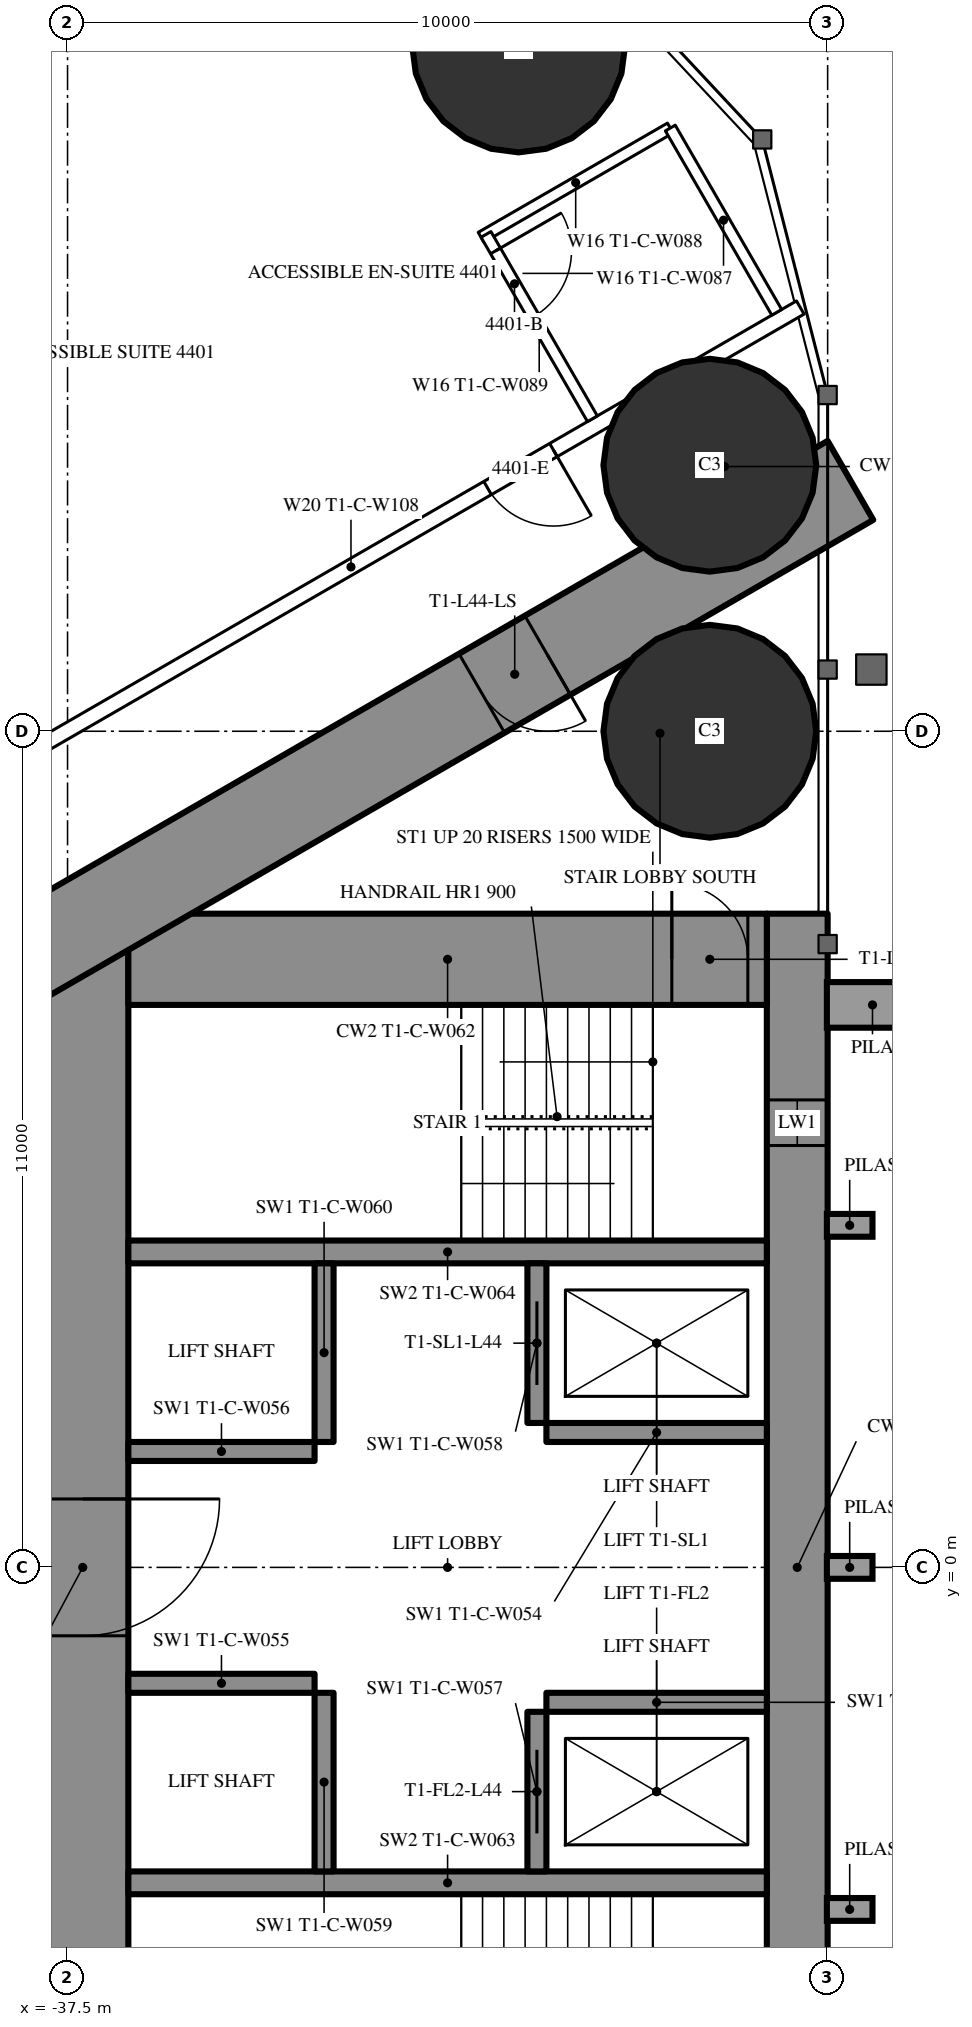
"""IFC4 building model, lengths in metres.
Left out: names, types, materials, properties, quantities, classifications, styles, units other than length and angle.
Written with IfcOpenShell. Run it as: python <this file> out.ifc"""

import sys

from ifc_helpers import new_model, si_unit, direction, frame, frame_2d, origin, origin_2d, place, context, subcontext, project, spatial, rectangle, circle, extrude, element, fill, save


model = new_model("IFC4")
c1 = context("Model", 3, precision=1e-05, world=origin(), true_north=direction((0.0, 1.0)))
c2 = subcontext(c1, "Body", "Model", "MODEL_VIEW")
j1 = project(units=[si_unit("LENGTHUNIT", "METRE"), si_unit("PLANEANGLEUNIT", "RADIAN")], contexts=[c1])
p1 = place(None, origin())
s1 = spatial("IfcSite", under=j1, at=p1, CompositionType="ELEMENT")
p2 = place(p1, origin())
s2 = spatial("IfcBuilding", under=s1, at=p2, CompositionType="ELEMENT")
p3 = place(p2, frame((0.0, 0.0, 166.8)))
s3 = spatial("IfcBuildingStorey", under=s2, at=p3, CompositionType="ELEMENT", Elevation=166.8)
for number, where, z_axis, x_axis in (
    (1, (-31.565, 20.016, 0.0), (0.0, 0.0, 1.0), (1.0, 0.0, 0.0)),
    (2, (-29.05, 11.0, 0.0), (0.0, 0.0, 1.0), (1.0, 0.0, 0.0)),
    (3, (-29.05, 14.5, 0.0), (0.0, 0.0, 1.0), (1.0, 0.0, 0.0)),
):
    element("IfcColumn", number, at=place(p3, frame(where, z_axis=z_axis, x_axis=x_axis)), inside=s3, PredefinedType="COLUMN", context=c2, shape_type="SweptSolid", body=[
        extrude(circle(Radius=1.4, at=origin_2d()), origin(), (0.0, 0.0, 1.0), 3.5),
    ])
p4 = place(p3, frame((-27.9, 8.6, 0.0), z_axis=(0.0, 0.0, 1.0), x_axis=(0.0, -1.0, 0.0)))
e4 = element("IfcWall", 4, at=p4, inside=s3, PredefinedType="SHEAR", context=c2, shape_type="SweptSolid", body=[
    extrude(rectangle(XDim=17.2, YDim=0.8, at=frame_2d((8.6, 0.0))), origin(), (0.0, 0.0, 1.0), 3.5),
])
p5 = place(p4, frame((2.45, 0.0, 0.6)))
e5 = element("IfcOpeningElement", 5, at=p5, cuts=e4, PredefinedType="OPENING", context=c2, shape_type="SweptSolid", body=[
    extrude(rectangle(XDim=0.6, YDim=2.1, at=frame_2d((0.3, 1.05))), frame((0.0, 0.41, 0.0), z_axis=(0.0, -1.0, 0.0), x_axis=(1.0, 0.0, 0.0)), (0.0, 0.0, 1.0), 0.82),
])
p6 = place(p4, frame((14.15, 0.0, 0.6)))
e6 = element("IfcOpeningElement", 6, at=p6, cuts=e4, PredefinedType="OPENING", context=c2, shape_type="SweptSolid", body=[
    extrude(rectangle(XDim=0.6, YDim=2.1, at=frame_2d((0.3, 1.05))), frame((0.0, 0.41, 0.0), z_axis=(0.0, -1.0, 0.0), x_axis=(1.0, 0.0, 0.0)), (0.0, 0.0, 1.0), 0.82),
])
p7 = place(p3, frame((-37.3, 8.6, 0.0), z_axis=(0.0, 0.0, 1.0), x_axis=(0.0, -1.0, 0.0)))
e7 = element("IfcWall", 7, at=p7, inside=s3, PredefinedType="SHEAR", context=c2, shape_type="SweptSolid", body=[
    extrude(rectangle(XDim=17.2, YDim=1.2, at=frame_2d((8.6, 0.0))), origin(), (0.0, 0.0, 1.0), 3.5),
])
p8 = place(p7, frame((7.7, 0.0, 0.0)))
e8 = element("IfcOpeningElement", 8, at=p8, cuts=e7, PredefinedType="OPENING", context=c2, shape_type="SweptSolid", body=[
    extrude(rectangle(XDim=1.8, YDim=2.2, at=frame_2d((0.9, 1.1))), frame((0.0, 0.61, 0.0), z_axis=(0.0, -1.0, 0.0), x_axis=(1.0, 0.0, 0.0)), (0.0, 0.0, 1.0), 1.22),
])
p9 = place(p3, frame((-28.3, 8.0, 0.0), z_axis=(0.0, 0.0, 1.0), x_axis=(-1.0, 0.0, 0.0)))
e9 = element("IfcWall", 9, at=p9, inside=s3, PredefinedType="SHEAR", context=c2, shape_type="SweptSolid", body=[
    extrude(rectangle(XDim=8.4, YDim=1.2, at=frame_2d((4.2, 0.0))), origin(), (0.0, 0.0, 1.0), 3.5),
])
p10 = place(p9, frame((0.25, 0.0, 0.0)))
e10 = element("IfcOpeningElement", 10, at=p10, cuts=e9, PredefinedType="OPENING", context=c2, shape_type="SweptSolid", body=[
    extrude(rectangle(XDim=1.0, YDim=2.2, at=frame_2d((0.5, 1.1))), frame((0.0, 0.61, 0.0), z_axis=(0.0, -1.0, 0.0), x_axis=(1.0, 0.0, 0.0)), (0.0, 0.0, 1.0), 1.22),
])
for number, where, z_axis, x_axis in (
    (11, (-28.3, 4.15, 0.0), (0.0, 0.0, 1.0), (-1.0, 0.0, 0.0)),
    (12, (-28.3, -4.15, 0.0), (0.0, 0.0, 1.0), (-1.0, 0.0, 0.0)),
):
    element("IfcWall", number, at=place(p3, frame(where, z_axis=z_axis, x_axis=x_axis)), inside=s3, PredefinedType="SHEAR", context=c2, shape_type="SweptSolid", body=[
        extrude(rectangle(XDim=8.4, YDim=0.3, at=frame_2d((4.2, 0.0))), origin(), (0.0, 0.0, 1.0), 3.5),
    ])
p11 = place(p3, frame((-31.325, 4.0, 0.0), z_axis=(0.0, 0.0, 1.0), x_axis=(0.0, -1.0, 0.0)))
e13 = element("IfcWall", 13, at=p11, inside=s3, PredefinedType="SHEAR", context=c2, shape_type="SweptSolid", body=[
    extrude(rectangle(XDim=2.1, YDim=0.25, at=frame_2d((1.05, 0.0))), origin(), (0.0, 0.0, 1.0), 3.5),
])
p12 = place(p11, frame((0.5, 0.0, 0.0)))
e14 = element("IfcOpeningElement", 14, at=p12, cuts=e13, PredefinedType="OPENING", context=c2, shape_type="SweptSolid", body=[
    extrude(rectangle(XDim=1.1, YDim=2.2, at=frame_2d((0.55, 1.1))), frame((0.0, 0.135, 0.0), z_axis=(0.0, -1.0, 0.0), x_axis=(1.0, 0.0, 0.0)), (0.0, 0.0, 1.0), 0.27),
])
p13 = place(p3, frame((-34.125, 4.0, 0.0), z_axis=(0.0, 0.0, 1.0), x_axis=(0.0, -1.0, 0.0)))
e15 = element("IfcWall", 15, at=p13, inside=s3, PredefinedType="SHEAR", context=c2, shape_type="SweptSolid", body=[
    extrude(rectangle(XDim=2.35, YDim=0.25, at=frame_2d((1.175, 0.0))), origin(), (0.0, 0.0, 1.0), 3.5),
])
p14 = place(p3, frame((-28.3, 1.775, 0.0), z_axis=(0.0, 0.0, 1.0), x_axis=(-1.0, 0.0, 0.0)))
e16 = element("IfcWall", 16, at=p14, inside=s3, PredefinedType="SHEAR", context=c2, shape_type="SweptSolid", body=[
    extrude(rectangle(XDim=2.9, YDim=0.25, at=frame_2d((1.45, 0.0))), origin(), (0.0, 0.0, 1.0), 3.5),
])
p15 = place(p3, frame((-34.25, 1.525, 0.0), z_axis=(0.0, 0.0, 1.0), x_axis=(-1.0, 0.0, 0.0)))
e17 = element("IfcWall", 17, at=p15, inside=s3, PredefinedType="SHEAR", context=c2, shape_type="SweptSolid", body=[
    extrude(rectangle(XDim=2.45, YDim=0.25, at=frame_2d((1.225, 0.0))), origin(), (0.0, 0.0, 1.0), 3.5),
])
p16 = place(p3, frame((-31.325, -1.9, 0.0), z_axis=(0.0, 0.0, 1.0), x_axis=(0.0, -1.0, 0.0)))
e18 = element("IfcWall", 18, at=p16, inside=s3, PredefinedType="SHEAR", context=c2, shape_type="SweptSolid", body=[
    extrude(rectangle(XDim=2.1, YDim=0.25, at=frame_2d((1.05, 0.0))), origin(), (0.0, 0.0, 1.0), 3.5),
])
p17 = place(p16, frame((0.5, 0.0, 0.0)))
e19 = element("IfcOpeningElement", 19, at=p17, cuts=e18, PredefinedType="OPENING", context=c2, shape_type="SweptSolid", body=[
    extrude(rectangle(XDim=1.1, YDim=2.2, at=frame_2d((0.55, 1.1))), frame((0.0, 0.135, 0.0), z_axis=(0.0, -1.0, 0.0), x_axis=(1.0, 0.0, 0.0)), (0.0, 0.0, 1.0), 0.27),
])
p18 = place(p3, frame((-34.125, -1.65, 0.0), z_axis=(0.0, 0.0, 1.0), x_axis=(0.0, -1.0, 0.0)))
e20 = element("IfcWall", 20, at=p18, inside=s3, PredefinedType="SHEAR", context=c2, shape_type="SweptSolid", body=[
    extrude(rectangle(XDim=2.35, YDim=0.25, at=frame_2d((1.175, 0.0))), origin(), (0.0, 0.0, 1.0), 3.5),
])
p19 = place(p3, frame((-28.3, -1.775, 0.0), z_axis=(0.0, 0.0, 1.0), x_axis=(-1.0, 0.0, 0.0)))
e21 = element("IfcWall", 21, at=p19, inside=s3, PredefinedType="SHEAR", context=c2, shape_type="SweptSolid", body=[
    extrude(rectangle(XDim=2.9, YDim=0.25, at=frame_2d((1.45, 0.0))), origin(), (0.0, 0.0, 1.0), 3.5),
])
p20 = place(p3, frame((-34.25, -1.525, 0.0), z_axis=(0.0, 0.0, 1.0), x_axis=(-1.0, 0.0, 0.0)))
e22 = element("IfcWall", 22, at=p20, inside=s3, PredefinedType="SHEAR", context=c2, shape_type="SweptSolid", body=[
    extrude(rectangle(XDim=2.45, YDim=0.25, at=frame_2d((1.225, 0.0))), origin(), (0.0, 0.0, 1.0), 3.5),
])
p21 = place(p3, frame((-27.2, 14.3, 0.0), z_axis=(0.0, 0.0, 1.0), x_axis=(-0.866026593062, -0.499997940104, 0.0)))
e23 = element("IfcWall", 23, at=p21, inside=s3, PredefinedType="SHEAR", context=c2, shape_type="SweptSolid", body=[
    extrude(rectangle(XDim=28.946, YDim=1.2, at=frame_2d((14.473, 0.0))), origin(), (0.0, 0.0, 1.0), 3.5),
])
p22 = place(p21, frame((4.6, 0.0, 0.0)))
e24 = element("IfcOpeningElement", 24, at=p22, cuts=e23, PredefinedType="OPENING", context=c2, shape_type="SweptSolid", body=[
    extrude(rectangle(XDim=1.0, YDim=2.2, at=frame_2d((0.5, 1.1))), frame((0.0, 0.61, 0.0), z_axis=(0.0, -1.0, 0.0), x_axis=(1.0, 0.0, 0.0)), (0.0, 0.0, 1.0), 1.22),
])
p23 = place(p21, frame((13.395, 0.0, 0.0)))
e25 = element("IfcOpeningElement", 25, at=p23, cuts=e23, PredefinedType="OPENING", context=c2, shape_type="SweptSolid", body=[
    extrude(rectangle(XDim=1.8, YDim=2.2, at=frame_2d((0.9, 1.1))), frame((0.0, 0.61, 0.0), z_axis=(0.0, -1.0, 0.0), x_axis=(1.0, 0.0, 0.0)), (0.0, 0.0, 1.0), 1.22),
])
p24 = place(p3, frame((-27.2, -14.3, 0.0), z_axis=(0.0, 0.0, 1.0), x_axis=(-0.866024021859, 0.500002393557, 0.0)))
e26 = element("IfcWall", 26, at=p24, inside=s3, PredefinedType="SHEAR", context=c2, shape_type="SweptSolid", body=[
    extrude(rectangle(XDim=27.907, YDim=1.2, at=frame_2d((13.954, 0.0))), origin(), (0.0, 0.0, 1.0), 3.5),
])
p25 = place(p24, frame((4.6, 0.0, 0.0)))
e27 = element("IfcOpeningElement", 27, at=p25, cuts=e26, PredefinedType="OPENING", context=c2, shape_type="SweptSolid", body=[
    extrude(rectangle(XDim=1.0, YDim=2.2, at=frame_2d((0.5, 1.1))), frame((0.0, 0.61, 0.0), z_axis=(0.0, -1.0, 0.0), x_axis=(1.0, 0.0, 0.0)), (0.0, 0.0, 1.0), 1.22),
])
p26 = place(p24, frame((13.395, 0.0, 0.0)))
e28 = element("IfcOpeningElement", 28, at=p26, cuts=e26, PredefinedType="OPENING", context=c2, shape_type="SweptSolid", body=[
    extrude(rectangle(XDim=1.8, YDim=2.2, at=frame_2d((0.9, 1.1))), frame((0.0, 0.61, 0.0), z_axis=(0.0, -1.0, 0.0), x_axis=(1.0, 0.0, 0.0)), (0.0, 0.0, 1.0), 1.22),
])
p27 = place(p3, frame((-27.86, 16.575, 0.0), z_axis=(0.0, 0.0, 1.0), x_axis=(-0.866026850238, -0.499997494661, 0.0)))
e29 = element("IfcWall", 29, at=p27, inside=s3, PredefinedType="PARTITIONING", context=c2, shape_type="SweptSolid", body=[
    extrude(rectangle(XDim=13.651, YDim=0.2, at=frame_2d((6.826, 0.0))), origin(), (0.0, 0.0, 1.0), 3.25),
])
p28 = place(p27, frame((3.75, 0.0, 0.0)))
e30 = element("IfcOpeningElement", 30, at=p28, cuts=e29, PredefinedType="OPENING", context=c2, shape_type="SweptSolid", body=[
    extrude(rectangle(XDim=1.0, YDim=2.2, at=frame_2d((0.5, 1.1))), frame((0.0, 0.11, 0.0), z_axis=(0.0, -1.0, 0.0), x_axis=(1.0, 0.0, 0.0)), (0.0, 0.0, 1.0), 0.22),
])
p29 = place(p3, frame((-29.57, 18.936, 0.0), z_axis=(0.0, 0.0, 1.0), x_axis=(-0.866018712932, -0.500011588718, 0.0)))
e31 = element("IfcWall", 31, at=p29, inside=s3, PredefinedType="PARTITIONING", context=c2, shape_type="SweptSolid", body=[
    extrude(rectangle(XDim=2.875, YDim=0.15, at=frame_2d((1.438, 0.0))), origin(), (0.0, 0.0, 1.0), 3.25),
])
p30 = place(p3, frame((-30.595, 15.111, 0.0), z_axis=(0.0, 0.0, 1.0), x_axis=(-0.49998411664, 0.866034573852, 0.0)))
e32 = element("IfcWall", 32, at=p30, inside=s3, PredefinedType="PARTITIONING", context=c2, shape_type="SweptSolid", body=[
    extrude(rectangle(XDim=2.8, YDim=0.15, at=frame_2d((1.4, 0.0))), origin(), (0.0, 0.0, 1.0), 3.25),
])
p31 = place(p30, frame((1.55, 0.0, 0.0)))
e33 = element("IfcOpeningElement", 33, at=p31, cuts=e32, PredefinedType="OPENING", context=c2, shape_type="SweptSolid", body=[
    extrude(rectangle(XDim=1.0, YDim=2.2, at=frame_2d((0.5, 1.1))), frame((0.0, 0.085, 0.0), z_axis=(0.0, -1.0, 0.0), x_axis=(1.0, 0.0, 0.0)), (0.0, 0.0, 1.0), 0.17),
])
p32 = place(p3, frame((-28.17, 16.511, 0.0), z_axis=(0.0, 0.0, 1.0), x_axis=(-0.49994636267, 0.866056369097, 0.0)))
e34 = element("IfcWall", 34, at=p32, inside=s3, PredefinedType="PARTITIONING", context=c2, shape_type="SweptSolid", body=[
    extrude(rectangle(XDim=2.8, YDim=0.15, at=frame_2d((1.4, 0.0))), origin(), (0.0, 0.0, 1.0), 3.25),
])
p33 = place(p31, origin())
e35 = element("IfcDoor", 35, at=p33, inside=s3, OperationType="SINGLE_SWING_RIGHT", PredefinedType="DOOR", context=c2, shape_type="SweptSolid", body=[
    extrude(rectangle(XDim=1.0, YDim=2.2, at=frame_2d((0.5, 1.1))), frame((0.0, 0.025, 0.0), z_axis=(0.0, -1.0, 0.0), x_axis=(1.0, 0.0, 0.0)), (0.0, 0.0, 1.0), 0.05),
])
fill(e33, e35)
p34 = place(p28, origin())
e36 = element("IfcDoor", 36, at=p34, inside=s3, OperationType="SINGLE_SWING_LEFT", PredefinedType="DOOR", context=c2, shape_type="SweptSolid", body=[
    extrude(rectangle(XDim=1.0, YDim=2.2, at=frame_2d((0.5, 1.1))), frame((0.0, 0.025, 0.0), z_axis=(0.0, -1.0, 0.0), x_axis=(1.0, 0.0, 0.0)), (0.0, 0.0, 1.0), 0.05),
])
fill(e30, e36)
p35 = place(p22, origin())
e37 = element("IfcDoor", 37, at=p35, inside=s3, OperationType="SINGLE_SWING_LEFT", PredefinedType="DOOR", context=c2, shape_type="SweptSolid", body=[
    extrude(rectangle(XDim=1.0, YDim=2.2, at=frame_2d((0.5, 1.1))), frame((0.0, 0.025, 0.0), z_axis=(0.0, -1.0, 0.0), x_axis=(1.0, 0.0, 0.0)), (0.0, 0.0, 1.0), 0.05),
])
fill(e24, e37)
p36 = place(p8, origin())
e38 = element("IfcDoor", 38, at=p36, inside=s3, OperationType="DOUBLE_DOOR_SINGLE_SWING", PredefinedType="DOOR", context=c2, shape_type="SweptSolid", body=[
    extrude(rectangle(XDim=1.8, YDim=2.2, at=frame_2d((0.9, 1.1))), frame((0.0, 0.025, 0.0), z_axis=(0.0, -1.0, 0.0), x_axis=(1.0, 0.0, 0.0)), (0.0, 0.0, 1.0), 0.05),
])
fill(e8, e38)
p37 = place(p10, origin())
e39 = element("IfcDoor", 39, at=p37, inside=s3, OperationType="SINGLE_SWING_RIGHT", PredefinedType="DOOR", context=c2, shape_type="SweptSolid", body=[
    extrude(rectangle(XDim=1.0, YDim=2.2, at=frame_2d((0.5, 1.1))), frame((0.0, 0.025, 0.0), z_axis=(0.0, -1.0, 0.0), x_axis=(1.0, 0.0, 0.0)), (0.0, 0.0, 1.0), 0.05),
])
fill(e10, e39)
p38 = place(p12, origin())
e40 = element("IfcDoor", 40, at=p38, inside=s3, OperationType="SLIDING_TO_LEFT", PredefinedType="USERDEFINED", context=c2, shape_type="SweptSolid", body=[
    extrude(rectangle(XDim=1.1, YDim=2.2, at=frame_2d((0.55, 1.1))), frame((0.0, 0.025, 0.0), z_axis=(0.0, -1.0, 0.0), x_axis=(1.0, 0.0, 0.0)), (0.0, 0.0, 1.0), 0.05),
])
fill(e14, e40)
p39 = place(p17, origin())
e41 = element("IfcDoor", 41, at=p39, inside=s3, OperationType="SLIDING_TO_LEFT", PredefinedType="USERDEFINED", context=c2, shape_type="SweptSolid", body=[
    extrude(rectangle(XDim=1.1, YDim=2.2, at=frame_2d((0.55, 1.1))), frame((0.0, 0.025, 0.0), z_axis=(0.0, -1.0, 0.0), x_axis=(1.0, 0.0, 0.0)), (0.0, 0.0, 1.0), 0.05),
])
fill(e19, e41)
p40 = place(p5, origin())
e42 = element("IfcWindow", 42, at=p40, inside=s3, PartitioningType="SINGLE_PANEL", PredefinedType="WINDOW", context=c2, shape_type="SweptSolid", body=[
    extrude(rectangle(XDim=0.6, YDim=2.1, at=frame_2d((0.3, 1.05))), frame((0.0, 0.03, 0.0), z_axis=(0.0, -1.0, 0.0), x_axis=(1.0, 0.0, 0.0)), (0.0, 0.0, 1.0), 0.06),
])
fill(e5, e42)
save(model, sys.argv[1])
